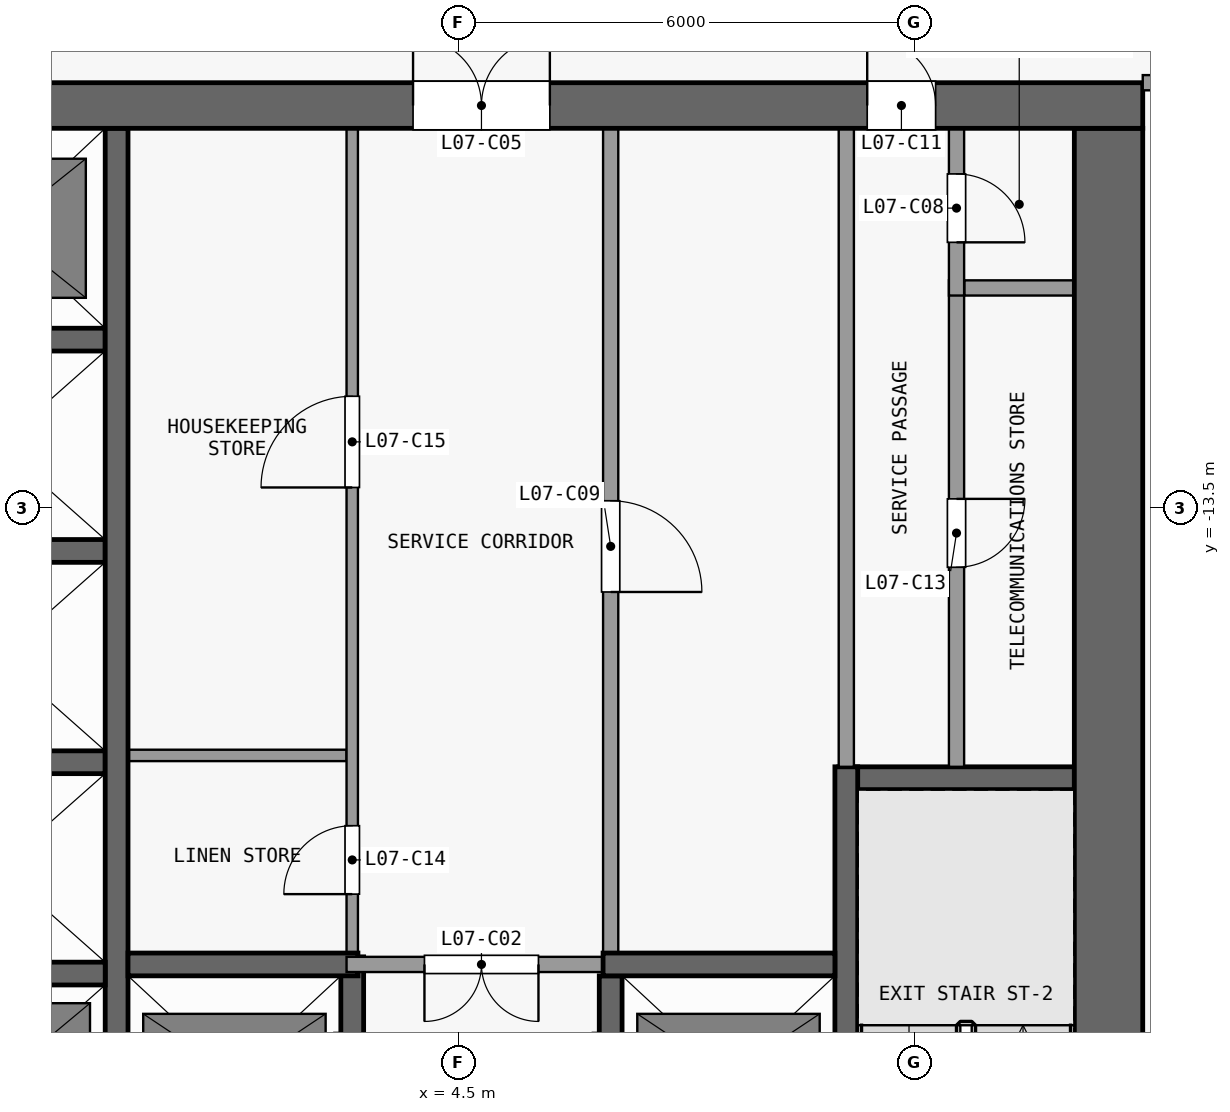
"""IFC4 building model, lengths in metres.
Left out: names, types, materials, properties, quantities, classifications, styles, units other than length and angle.
Written with IfcOpenShell. Run it as: python <this file> out.ifc"""

import sys

from ifc_helpers import new_model, si_unit, direction, frame, frame_2d, origin, place, context, subcontext, project, spatial, rectangle, extrude, element, fill, save


model = new_model("IFC4")
c1 = context("Model", 3, precision=1e-05, world=origin(), true_north=direction((0.0, 1.0)))
c2 = subcontext(c1, "Body", "Model", "MODEL_VIEW")
j1 = project(units=[si_unit("LENGTHUNIT", "METRE"), si_unit("PLANEANGLEUNIT", "RADIAN")], contexts=[c1])
p1 = place(None, origin())
s1 = spatial("IfcSite", under=j1, at=p1, CompositionType="ELEMENT")
p2 = place(p1, origin())
s2 = spatial("IfcBuilding", under=s1, at=p2, CompositionType="ELEMENT")
p3 = place(p2, frame((0.0, 0.0, 36.1)))
s3 = spatial("IfcBuildingStorey", under=s2, at=p3, CompositionType="ELEMENT", Elevation=36.1)
p4 = place(p3, frame((-13.5, -8.2, 0.0), z_axis=(0.0, 0.0, 1.0), x_axis=(1.0, 0.0, 0.0)))
e1 = element("IfcWall", 1, at=p4, inside=s3, PredefinedType="SHEAR", context=c2, shape_type="SweptSolid", body=[
    extrude(rectangle(XDim=27.0, YDim=0.6, at=frame_2d((13.5, 0.0))), origin(), (0.0, 0.0, 1.0), 3.3),
])
p5 = place(p4, frame((7.8, 0.0, 0.0)))
e2 = element("IfcOpeningElement", 2, at=p5, cuts=e1, PredefinedType="OPENING", context=c2, shape_type="SweptSolid", body=[
    extrude(rectangle(XDim=1.8, YDim=2.1, at=frame_2d((0.9, 1.05))), frame((0.0, 0.31, 0.0), z_axis=(0.0, -1.0, 0.0), x_axis=(1.0, 0.0, 0.0)), (0.0, 0.0, 1.0), 0.62),
])
p6 = place(p4, frame((17.4, 0.0, 0.0)))
e3 = element("IfcOpeningElement", 3, at=p6, cuts=e1, PredefinedType="OPENING", context=c2, shape_type="SweptSolid", body=[
    extrude(rectangle(XDim=1.8, YDim=2.1, at=frame_2d((0.9, 1.05))), frame((0.0, 0.31, 0.0), z_axis=(0.0, -1.0, 0.0), x_axis=(1.0, 0.0, 0.0)), (0.0, 0.0, 1.0), 0.62),
])
p7 = place(p4, frame((2.725, 0.0, 0.0)))
e4 = element("IfcOpeningElement", 4, at=p7, cuts=e1, PredefinedType="OPENING", context=c2, shape_type="SweptSolid", body=[
    extrude(rectangle(XDim=0.9, YDim=2.1, at=frame_2d((0.45, 1.05))), frame((0.0, 0.31, 0.0), z_axis=(0.0, -1.0, 0.0), x_axis=(1.0, 0.0, 0.0)), (0.0, 0.0, 1.0), 0.62),
])
p8 = place(p4, frame((23.375, 0.0, 0.0)))
e5 = element("IfcOpeningElement", 5, at=p8, cuts=e1, PredefinedType="OPENING", context=c2, shape_type="SweptSolid", body=[
    extrude(rectangle(XDim=0.9, YDim=2.1, at=frame_2d((0.45, 1.05))), frame((0.0, 0.31, 0.0), z_axis=(0.0, -1.0, 0.0), x_axis=(1.0, 0.0, 0.0)), (0.0, 0.0, 1.0), 0.62),
])
p9 = place(p3, frame((13.05, -24.6, 0.0), z_axis=(0.0, 0.0, 1.0), x_axis=(0.0, 1.0, 0.0)))
e6 = element("IfcWall", 6, at=p9, inside=s3, PredefinedType="SHEAR", context=c2, shape_type="SweptSolid", body=[
    extrude(rectangle(XDim=16.1, YDim=0.9, at=frame_2d((8.05, 0.0))), origin(), (0.0, 0.0, 1.0), 3.3),
])
p10 = place(p3, frame((-2.95, -19.62, 0.0), z_axis=(0.0, 0.0, 1.0), x_axis=(1.0, 0.0, 0.0)))
e7 = element("IfcWall", 7, at=p10, inside=s3, PredefinedType="SHEAR", context=c2, shape_type="SweptSolid", body=[
    extrude(rectangle(XDim=2.8, YDim=0.3, at=frame_2d((1.4, 0.0))), origin(), (0.0, 0.0, 1.0), 3.3),
])
p11 = place(p3, frame((0.15, -19.5, 0.0), z_axis=(0.0, 0.0, 1.0), x_axis=(1.0, 0.0, 0.0)))
e8 = element("IfcWall", 8, at=p11, inside=s3, PredefinedType="SHEAR", context=c2, shape_type="SweptSolid", body=[
    extrude(rectangle(XDim=3.025, YDim=0.3, at=frame_2d((1.513, 0.0))), origin(), (0.0, 0.0, 1.0), 3.3),
])
p12 = place(p3, frame((6.4, -19.5, 0.0), z_axis=(0.0, 0.0, 1.0), x_axis=(-1.0, 0.0, 0.0)))
e9 = element("IfcWall", 9, at=p12, inside=s3, PredefinedType="PARTITIONING", context=c2, shape_type="SweptSolid", body=[
    extrude(rectangle(XDim=3.375, YDim=0.2, at=frame_2d((1.688, 0.0))), origin(), (0.0, 0.0, 1.0), 3.3),
])
p13 = place(p12, frame((0.85, 0.0, 0.0)))
e10 = element("IfcOpeningElement", 10, at=p13, cuts=e9, PredefinedType="OPENING", context=c2, shape_type="SweptSolid", body=[
    extrude(rectangle(XDim=1.5, YDim=2.1, at=frame_2d((0.75, 1.05))), frame((0.0, 0.11, 0.0), z_axis=(0.0, -1.0, 0.0), x_axis=(1.0, 0.0, 0.0)), (0.0, 0.0, 1.0), 0.22),
])
p14 = place(p3, frame((6.4, -19.5, 0.0), z_axis=(0.0, 0.0, 1.0), x_axis=(1.0, 0.0, 0.0)))
e11 = element("IfcWall", 11, at=p14, inside=s3, PredefinedType="SHEAR", context=c2, shape_type="SweptSolid", body=[
    extrude(rectangle(XDim=3.05, YDim=0.3, at=frame_2d((1.525, 0.0))), origin(), (0.0, 0.0, 1.0), 3.3),
])
p15 = place(p3, frame((9.5, -17.05, 0.0), z_axis=(0.0, 0.0, 1.0), x_axis=(1.0, 0.0, 0.0)))
e12 = element("IfcWall", 12, at=p15, inside=s3, PredefinedType="SHEAR", context=c2, shape_type="SweptSolid", body=[
    extrude(rectangle(XDim=3.1, YDim=0.3, at=frame_2d((1.55, 0.0))), origin(), (0.0, 0.0, 1.0), 3.3),
])
p16 = place(p3, frame((-2.95, -16.84, 0.0), z_axis=(0.0, 0.0, 1.0), x_axis=(1.0, 0.0, 0.0)))
e13 = element("IfcWall", 13, at=p16, inside=s3, PredefinedType="SHEAR", context=c2, shape_type="SweptSolid", body=[
    extrude(rectangle(XDim=2.8, YDim=0.3, at=frame_2d((1.4, 0.0))), origin(), (0.0, 0.0, 1.0), 3.3),
])
p17 = place(p3, frame((0.15, -16.75, 0.0), z_axis=(0.0, 0.0, 1.0), x_axis=(1.0, 0.0, 0.0)))
e14 = element("IfcWall", 14, at=p17, inside=s3, PredefinedType="PARTITIONING", context=c2, shape_type="SweptSolid", body=[
    extrude(rectangle(XDim=2.875, YDim=0.15, at=frame_2d((1.438, 0.0))), origin(), (0.0, 0.0, 1.0), 3.3),
])
for number, where, z_axis, x_axis in (
    (15, (-2.95, -14.06, 0.0), (0.0, 0.0, 1.0), (1.0, 0.0, 0.0)),
    (16, (-2.95, -11.28, 0.0), (0.0, 0.0, 1.0), (1.0, 0.0, 0.0)),
):
    element("IfcWall", number, at=place(p3, frame(where, z_axis=z_axis, x_axis=x_axis)), inside=s3, PredefinedType="SHEAR", context=c2, shape_type="SweptSolid", body=[
        extrude(rectangle(XDim=2.8, YDim=0.3, at=frame_2d((1.4, 0.0))), origin(), (0.0, 0.0, 1.0), 3.3),
    ])
p18 = place(p3, frame((11.15, -10.6, 0.0), z_axis=(0.0, 0.0, 1.0), x_axis=(1.0, 0.0, 0.0)))
e17 = element("IfcWall", 17, at=p18, inside=s3, PredefinedType="PARTITIONING", context=c2, shape_type="SweptSolid", body=[
    extrude(rectangle(XDim=1.45, YDim=0.2, at=frame_2d((0.725, 0.0))), origin(), (0.0, 0.0, 1.0), 3.3),
])
p19 = place(p3, frame((0.0, -22.25, 0.0), z_axis=(0.0, 0.0, 1.0), x_axis=(0.0, 1.0, 0.0)))
e18 = element("IfcWall", 18, at=p19, inside=s3, PredefinedType="SHEAR", context=c2, shape_type="SweptSolid", body=[
    extrude(rectangle(XDim=13.75, YDim=0.3, at=frame_2d((6.875, 0.0))), origin(), (0.0, 0.0, 1.0), 3.3),
])
p20 = place(p3, frame((3.1, -22.25, 0.0), z_axis=(0.0, 0.0, 1.0), x_axis=(0.0, 1.0, 0.0)))
e19 = element("IfcWall", 19, at=p20, inside=s3, PredefinedType="SHEAR", context=c2, shape_type="SweptSolid", body=[
    extrude(rectangle(XDim=2.85, YDim=0.3, at=frame_2d((1.425, 0.0))), origin(), (0.0, 0.0, 1.0), 3.3),
])
p21 = place(p20, frame((0.75, 0.0, 0.0)))
e20 = element("IfcOpeningElement", 20, at=p21, cuts=e19, PredefinedType="OPENING", context=c2, shape_type="SweptSolid", body=[
    extrude(rectangle(XDim=1.1, YDim=2.1, at=frame_2d((0.55, 1.05))), frame((0.0, 0.16, 0.0), z_axis=(0.0, -1.0, 0.0), x_axis=(1.0, 0.0, 0.0)), (0.0, 0.0, 1.0), 0.32),
])
p22 = place(p3, frame((3.1, -19.4, 0.0), z_axis=(0.0, 0.0, 1.0), x_axis=(0.0, 1.0, 0.0)))
e21 = element("IfcWall", 21, at=p22, inside=s3, PredefinedType="PARTITIONING", context=c2, shape_type="SweptSolid", body=[
    extrude(rectangle(XDim=10.9, YDim=0.15, at=frame_2d((5.45, 0.0))), origin(), (0.0, 0.0, 1.0), 3.3),
])
p23 = place(p22, frame((0.825, 0.0, 0.0)))
e22 = element("IfcOpeningElement", 22, at=p23, cuts=e21, PredefinedType="OPENING", context=c2, shape_type="SweptSolid", body=[
    extrude(rectangle(XDim=0.9, YDim=2.1, at=frame_2d((0.45, 1.05))), frame((0.0, 0.085, 0.0), z_axis=(0.0, -1.0, 0.0), x_axis=(1.0, 0.0, 0.0)), (0.0, 0.0, 1.0), 0.17),
])
p24 = place(p22, frame((6.175, 0.0, 0.0)))
e23 = element("IfcOpeningElement", 23, at=p24, cuts=e21, PredefinedType="OPENING", context=c2, shape_type="SweptSolid", body=[
    extrude(rectangle(XDim=1.2, YDim=2.1, at=frame_2d((0.6, 1.05))), frame((0.0, 0.085, 0.0), z_axis=(0.0, -1.0, 0.0), x_axis=(1.0, 0.0, 0.0)), (0.0, 0.0, 1.0), 0.17),
])
p25 = place(p3, frame((6.5, -22.25, 0.0), z_axis=(0.0, 0.0, 1.0), x_axis=(0.0, 1.0, 0.0)))
e24 = element("IfcWall", 24, at=p25, inside=s3, PredefinedType="SHEAR", context=c2, shape_type="SweptSolid", body=[
    extrude(rectangle(XDim=2.6, YDim=0.3, at=frame_2d((1.3, 0.0))), origin(), (0.0, 0.0, 1.0), 3.3),
])
p26 = place(p25, frame((0.75, 0.0, 0.0)))
e25 = element("IfcOpeningElement", 25, at=p26, cuts=e24, PredefinedType="OPENING", context=c2, shape_type="SweptSolid", body=[
    extrude(rectangle(XDim=1.1, YDim=2.1, at=frame_2d((0.55, 1.05))), frame((0.0, 0.16, 0.0), z_axis=(0.0, -1.0, 0.0), x_axis=(1.0, 0.0, 0.0)), (0.0, 0.0, 1.0), 0.32),
])
p27 = place(p3, frame((6.5, -8.5, 0.0), z_axis=(0.0, 0.0, 1.0), x_axis=(0.0, -1.0, 0.0)))
e26 = element("IfcWall", 26, at=p27, inside=s3, PredefinedType="PARTITIONING", context=c2, shape_type="SweptSolid", body=[
    extrude(rectangle(XDim=10.85, YDim=0.2, at=frame_2d((5.425, 0.0))), origin(), (0.0, 0.0, 1.0), 3.3),
])
p28 = place(p27, frame((4.9, 0.0, 0.0)))
e27 = element("IfcOpeningElement", 27, at=p28, cuts=e26, PredefinedType="OPENING", context=c2, shape_type="SweptSolid", body=[
    extrude(rectangle(XDim=1.2, YDim=2.1, at=frame_2d((0.6, 1.05))), frame((0.0, 0.11, 0.0), z_axis=(0.0, -1.0, 0.0), x_axis=(1.0, 0.0, 0.0)), (0.0, 0.0, 1.0), 0.22),
])
p29 = place(p3, frame((9.6, -16.9, 0.0), z_axis=(0.0, 0.0, 1.0), x_axis=(0.0, -1.0, 0.0)))
e28 = element("IfcWall", 28, at=p29, inside=s3, PredefinedType="SHEAR", context=c2, shape_type="SweptSolid", body=[
    extrude(rectangle(XDim=7.7, YDim=0.3, at=frame_2d((3.85, 0.0))), origin(), (0.0, 0.0, 1.0), 3.3),
])
p30 = place(p29, frame((6.5, 0.0, 0.0)))
e29 = element("IfcOpeningElement", 29, at=p30, cuts=e28, PredefinedType="OPENING", context=c2, shape_type="SweptSolid", body=[
    extrude(rectangle(XDim=1.1, YDim=2.1, at=frame_2d((0.55, 1.05))), frame((0.0, 0.16, 0.0), z_axis=(0.0, -1.0, 0.0), x_axis=(1.0, 0.0, 0.0)), (0.0, 0.0, 1.0), 0.32),
])
p31 = place(p3, frame((9.6, -16.9, 0.0), z_axis=(0.0, 0.0, 1.0), x_axis=(0.0, 1.0, 0.0)))
e30 = element("IfcWall", 30, at=p31, inside=s3, PredefinedType="PARTITIONING", context=c2, shape_type="SweptSolid", body=[
    extrude(rectangle(XDim=8.4, YDim=0.2, at=frame_2d((4.2, 0.0))), origin(), (0.0, 0.0, 1.0), 3.3),
])
p32 = place(p3, frame((11.05, -10.5, 0.0), z_axis=(0.0, 0.0, 1.0), x_axis=(0.0, -1.0, 0.0)))
e31 = element("IfcWall", 31, at=p32, inside=s3, PredefinedType="PARTITIONING", context=c2, shape_type="SweptSolid", body=[
    extrude(rectangle(XDim=6.4, YDim=0.2, at=frame_2d((3.2, 0.0))), origin(), (0.0, 0.0, 1.0), 3.3),
])
p33 = place(p32, frame((2.875, 0.0, 0.0)))
e32 = element("IfcOpeningElement", 32, at=p33, cuts=e31, PredefinedType="OPENING", context=c2, shape_type="SweptSolid", body=[
    extrude(rectangle(XDim=0.9, YDim=2.1, at=frame_2d((0.45, 1.05))), frame((0.0, 0.11, 0.0), z_axis=(0.0, -1.0, 0.0), x_axis=(1.0, 0.0, 0.0)), (0.0, 0.0, 1.0), 0.22),
])
p34 = place(p3, frame((11.05, -8.5, 0.0), z_axis=(0.0, 0.0, 1.0), x_axis=(0.0, -1.0, 0.0)))
e33 = element("IfcWall", 33, at=p34, inside=s3, PredefinedType="PARTITIONING", context=c2, shape_type="SweptSolid", body=[
    extrude(rectangle(XDim=2.2, YDim=0.2, at=frame_2d((1.1, 0.0))), origin(), (0.0, 0.0, 1.0), 3.3),
])
p35 = place(p34, frame((0.6, 0.0, 0.0)))
e34 = element("IfcOpeningElement", 34, at=p35, cuts=e33, PredefinedType="OPENING", context=c2, shape_type="SweptSolid", body=[
    extrude(rectangle(XDim=0.9, YDim=2.1, at=frame_2d((0.45, 1.05))), frame((0.0, 0.11, 0.0), z_axis=(0.0, -1.0, 0.0), x_axis=(1.0, 0.0, 0.0)), (0.0, 0.0, 1.0), 0.22),
])
p36 = place(p3, frame((13.5, -7.9, 0.0), z_axis=(0.0, 0.0, 1.0), x_axis=(1.0, 0.0, 0.0)))
e35 = element("IfcWall", 35, at=p36, inside=s3, PredefinedType="PARTITIONING", context=c2, shape_type="SweptSolid", body=[
    extrude(rectangle(XDim=12.65, YDim=0.2, at=frame_2d((6.325, 0.0))), origin(), (0.0, 0.0, 1.0), 3.3),
])
p37 = place(p36, frame((1.0, 0.0, 0.0)))
e36 = element("IfcOpeningElement", 36, at=p37, cuts=e35, PredefinedType="OPENING", context=c2, shape_type="SweptSolid", body=[
    extrude(rectangle(XDim=1.0, YDim=2.1, at=frame_2d((0.5, 1.05))), frame((0.0, 0.11, 0.0), z_axis=(0.0, -1.0, 0.0), x_axis=(1.0, 0.0, 0.0)), (0.0, 0.0, 1.0), 0.22),
])
p38 = place(p13, origin())
e37 = element("IfcDoor", 37, at=p38, inside=s3, OperationType="DOUBLE_DOOR_SINGLE_SWING", PredefinedType="DOOR", context=c2, shape_type="SweptSolid", body=[
    extrude(rectangle(XDim=1.5, YDim=2.1, at=frame_2d((0.75, 1.05))), frame((0.0, 0.025, 0.0), z_axis=(0.0, -1.0, 0.0), x_axis=(1.0, 0.0, 0.0)), (0.0, 0.0, 1.0), 0.05),
])
fill(e10, e37)
p39 = place(p6, origin())
e38 = element("IfcDoor", 38, at=p39, inside=s3, OperationType="DOUBLE_DOOR_SINGLE_SWING", PredefinedType="DOOR", context=c2, shape_type="SweptSolid", body=[
    extrude(rectangle(XDim=1.8, YDim=2.1, at=frame_2d((0.9, 1.05))), frame((0.0, 0.025, 0.0), z_axis=(0.0, -1.0, 0.0), x_axis=(1.0, 0.0, 0.0)), (0.0, 0.0, 1.0), 0.05),
])
fill(e3, e38)
p40 = place(p35, origin())
e39 = element("IfcDoor", 39, at=p40, inside=s3, OperationType="SINGLE_SWING_RIGHT", PredefinedType="DOOR", context=c2, shape_type="SweptSolid", body=[
    extrude(rectangle(XDim=0.9, YDim=2.1, at=frame_2d((0.45, 1.05))), frame((0.0, 0.025, 0.0), z_axis=(0.0, -1.0, 0.0), x_axis=(1.0, 0.0, 0.0)), (0.0, 0.0, 1.0), 0.05),
])
fill(e34, e39)
p41 = place(p28, origin())
e40 = element("IfcDoor", 40, at=p41, inside=s3, OperationType="SINGLE_SWING_RIGHT", PredefinedType="DOOR", context=c2, shape_type="SweptSolid", body=[
    extrude(rectangle(XDim=1.2, YDim=2.1, at=frame_2d((0.6, 1.05))), frame((0.0, 0.025, 0.0), z_axis=(0.0, -1.0, 0.0), x_axis=(1.0, 0.0, 0.0)), (0.0, 0.0, 1.0), 0.05),
])
fill(e27, e40)
p42 = place(p8, origin())
e41 = element("IfcDoor", 41, at=p42, inside=s3, OperationType="SINGLE_SWING_LEFT", PredefinedType="DOOR", context=c2, shape_type="SweptSolid", body=[
    extrude(rectangle(XDim=0.9, YDim=2.1, at=frame_2d((0.45, 1.05))), frame((0.0, 0.025, 0.0), z_axis=(0.0, -1.0, 0.0), x_axis=(1.0, 0.0, 0.0)), (0.0, 0.0, 1.0), 0.05),
])
fill(e5, e41)
p43 = place(p33, origin())
e42 = element("IfcDoor", 42, at=p43, inside=s3, OperationType="SINGLE_SWING_LEFT", PredefinedType="DOOR", context=c2, shape_type="SweptSolid", body=[
    extrude(rectangle(XDim=0.9, YDim=2.1, at=frame_2d((0.45, 1.05))), frame((0.0, 0.025, 0.0), z_axis=(0.0, -1.0, 0.0), x_axis=(1.0, 0.0, 0.0)), (0.0, 0.0, 1.0), 0.05),
])
fill(e32, e42)
p44 = place(p23, origin())
e43 = element("IfcDoor", 43, at=p44, inside=s3, OperationType="SINGLE_SWING_LEFT", PredefinedType="DOOR", context=c2, shape_type="SweptSolid", body=[
    extrude(rectangle(XDim=0.9, YDim=2.1, at=frame_2d((0.45, 1.05))), frame((0.0, 0.025, 0.0), z_axis=(0.0, -1.0, 0.0), x_axis=(1.0, 0.0, 0.0)), (0.0, 0.0, 1.0), 0.05),
])
fill(e22, e43)
p45 = place(p24, origin())
e44 = element("IfcDoor", 44, at=p45, inside=s3, OperationType="SINGLE_SWING_LEFT", PredefinedType="DOOR", context=c2, shape_type="SweptSolid", body=[
    extrude(rectangle(XDim=1.2, YDim=2.1, at=frame_2d((0.6, 1.05))), frame((0.0, 0.025, 0.0), z_axis=(0.0, -1.0, 0.0), x_axis=(1.0, 0.0, 0.0)), (0.0, 0.0, 1.0), 0.05),
])
fill(e23, e44)
save(model, sys.argv[1])
